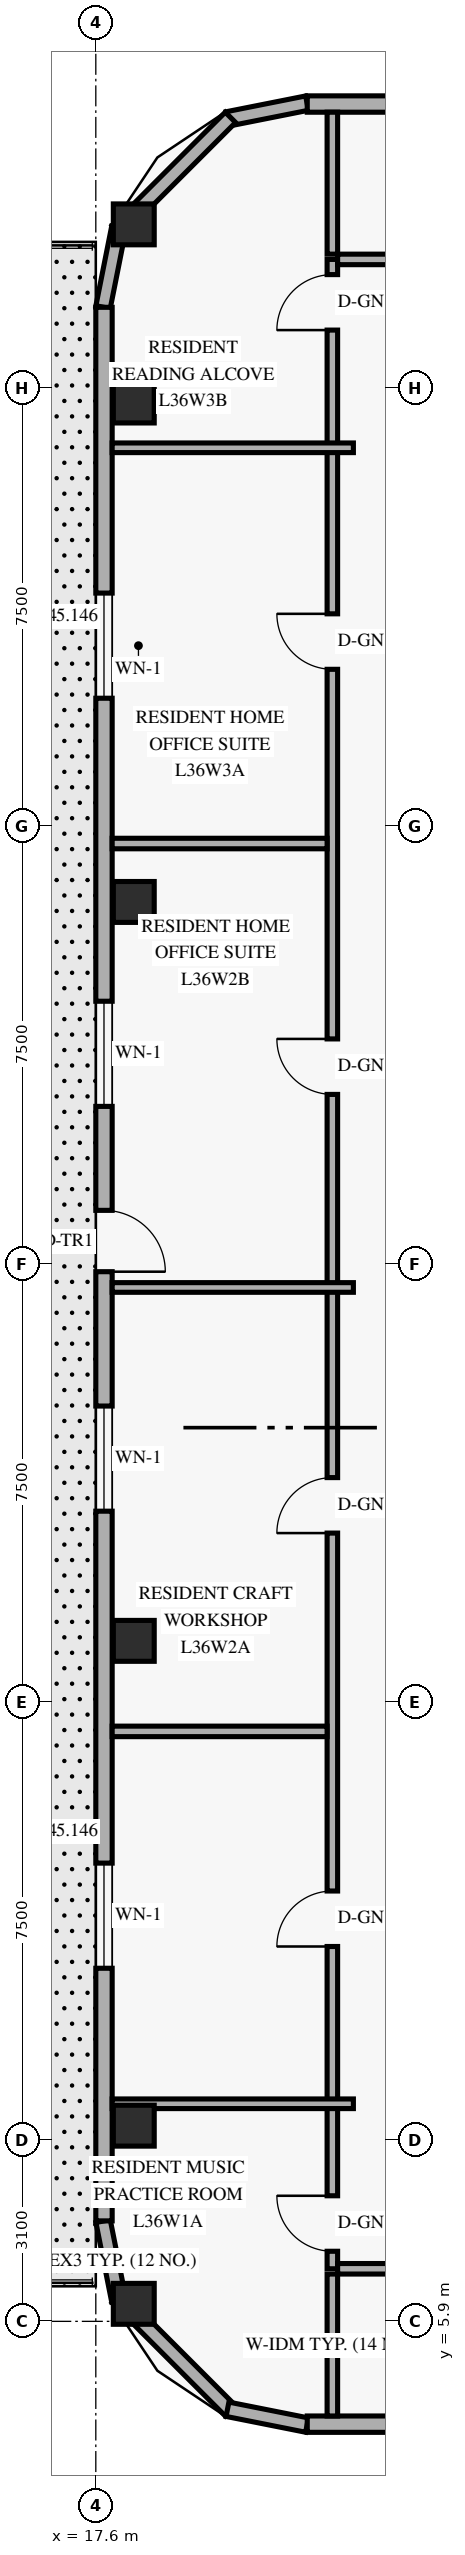
"""IFC4 building model, lengths in metres.
Left out: names, types, materials, properties, quantities, classifications, styles, units other than length and angle.
Written with IfcOpenShell. Run it as: python <this file> out.ifc"""

import sys

from ifc_helpers import new_model, si_unit, direction, frame, frame_2d, origin, origin_2d, place, context, subcontext, project, spatial, rectangle, extrude, element, fill, save


model = new_model("IFC4")
c1 = context("Model", 3, precision=1e-05, world=origin(), true_north=direction((0.0, 1.0)))
c2 = subcontext(c1, "Body", "Model", "MODEL_VIEW")
j1 = project(units=[si_unit("LENGTHUNIT", "METRE"), si_unit("PLANEANGLEUNIT", "RADIAN")], contexts=[c1])
p1 = place(None, origin())
s1 = spatial("IfcSite", under=j1, at=p1, CompositionType="ELEMENT")
p2 = place(p1, origin())
s2 = spatial("IfcBuilding", under=s1, at=p2, CompositionType="ELEMENT")
p3 = place(p2, frame((0.0, 0.0, 141.0)))
s3 = spatial("IfcBuildingStorey", under=s2, at=p3, CompositionType="ELEMENT", Elevation=141.0)
for number, where, z_axis, x_axis in (
    (1, (18.25, 6.2, 0.0), (0.0, 0.0, 1.0), (1.0, 0.0, 0.0)),
    (2, (18.25, 9.25, 0.0), (0.0, 0.0, 1.0), (1.0, 0.0, 0.0)),
    (3, (18.25, 17.55, 0.0), (0.0, 0.0, 1.0), (1.0, 0.0, 0.0)),
    (4, (18.25, 30.2, 0.0), (0.0, 0.0, 1.0), (1.0, 0.0, 0.0)),
    (5, (18.25, 38.75, 0.0), (0.0, 0.0, 1.0), (1.0, 0.0, 0.0)),
    (6, (18.25, 41.8, 0.0), (0.0, 0.0, 1.0), (1.0, 0.0, 0.0)),
):
    element("IfcColumn", number, at=place(p3, frame(where, z_axis=z_axis, x_axis=x_axis)), inside=s3, PredefinedType="COLUMN", context=c2, shape_type="SweptSolid", body=[
        extrude(rectangle(XDim=0.7, YDim=0.7, at=origin_2d()), origin(), (0.0, 0.0, 1.0), 3.6),
    ])
p4 = place(p3, frame((17.724, 7.616, 0.0), z_axis=(0.0, 0.0, 1.0), x_axis=(0.195135625965, -0.9807762678, 0.0)))
e7 = element("IfcWall", 7, at=p4, inside=s3, PredefinedType="SOLIDWALL", context=c2, shape_type="SweptSolid", body=[
    extrude(rectangle(XDim=1.389, YDim=0.25, at=frame_2d((0.694, 0.0))), origin(), (0.0, 0.0, 1.0), 3.36),
])
p5 = place(p3, frame((17.968, 6.305, 0.0), z_axis=(0.0, 0.0, 1.0), x_axis=(0.707106781187, -0.707106781187, 0.0)))
e8 = element("IfcWall", 8, at=p5, inside=s3, PredefinedType="SOLIDWALL", context=c2, shape_type="SweptSolid", body=[
    extrude(rectangle(XDim=2.739, YDim=0.25, at=frame_2d((1.37, 0.0))), origin(), (0.0, 0.0, 1.0), 3.36),
])
for number, where, z_axis, x_axis in (
    (9, (19.854, 4.395, 0.0), (0.0, 0.0, 1.0), (0.981, -0.195, 0.0)),
    (10, (21.217, 43.876, 0.0), (0.0, 0.0, 1.0), (-0.981, -0.195, 0.0)),
):
    element("IfcWall", number, at=place(p3, frame(where, z_axis=z_axis, x_axis=x_axis)), inside=s3, PredefinedType="SOLIDWALL", context=c2, shape_type="SweptSolid", body=[
        extrude(rectangle(XDim=1.389, YDim=0.25, at=frame_2d((0.694, 0.0))), origin(), (0.0, 0.0, 1.0), 3.36),
    ])
p6 = place(p3, frame((19.905, 43.632, 0.0), z_axis=(0.0, 0.0, 1.0), x_axis=(-0.707106781187, -0.707106781187, 0.0)))
e11 = element("IfcWall", 11, at=p6, inside=s3, PredefinedType="SOLIDWALL", context=c2, shape_type="SweptSolid", body=[
    extrude(rectangle(XDim=2.739, YDim=0.25, at=frame_2d((1.37, 0.0))), origin(), (0.0, 0.0, 1.0), 3.36),
])
p7 = place(p3, frame((17.995, 41.746, 0.0), z_axis=(0.0, 0.0, 1.0), x_axis=(-0.195135625965, -0.9807762678, 0.0)))
e12 = element("IfcWall", 12, at=p7, inside=s3, PredefinedType="SOLIDWALL", context=c2, shape_type="SweptSolid", body=[
    extrude(rectangle(XDim=1.389, YDim=0.25, at=frame_2d((0.694, 0.0))), origin(), (0.0, 0.0, 1.0), 3.36),
])
p8 = place(p3, frame((21.22, 4.14, 0.0), z_axis=(0.0, 0.0, 1.0), x_axis=(1.0, 0.0, 0.0)))
e13 = element("IfcWall", 13, at=p8, inside=s3, PredefinedType="SOLIDWALL", context=c2, shape_type="SweptSolid", body=[
    extrude(rectangle(XDim=33.76, YDim=0.28, at=frame_2d((16.88, 0.0))), origin(), (0.0, 0.0, 1.0), 3.36),
])
p9 = place(p8, frame((2.33, 0.0, 0.85)))
e14 = element("IfcOpeningElement", 14, at=p9, cuts=e13, PredefinedType="OPENING", context=c2, shape_type="SweptSolid", body=[
    extrude(rectangle(XDim=1.65, YDim=1.6, at=frame_2d((0.825, 0.8))), frame((0.0, 0.15, 0.0), z_axis=(0.0, -1.0, 0.0), x_axis=(1.0, 0.0, 0.0)), (0.0, 0.0, 1.0), 0.3),
])
p10 = place(p8, frame((9.215, 0.0, 0.85)))
e15 = element("IfcOpeningElement", 15, at=p10, cuts=e13, PredefinedType="OPENING", context=c2, shape_type="SweptSolid", body=[
    extrude(rectangle(XDim=1.65, YDim=1.6, at=frame_2d((0.825, 0.8))), frame((0.0, 0.15, 0.0), z_axis=(0.0, -1.0, 0.0), x_axis=(1.0, 0.0, 0.0)), (0.0, 0.0, 1.0), 0.3),
])
p11 = place(p8, frame((14.64, 0.0, 0.85)))
e16 = element("IfcOpeningElement", 16, at=p11, cuts=e13, PredefinedType="OPENING", context=c2, shape_type="SweptSolid", body=[
    extrude(rectangle(XDim=1.65, YDim=1.6, at=frame_2d((0.825, 0.8))), frame((0.0, 0.15, 0.0), z_axis=(0.0, -1.0, 0.0), x_axis=(1.0, 0.0, 0.0)), (0.0, 0.0, 1.0), 0.3),
])
p12 = place(p8, frame((19.367, 0.0, 0.85)))
e17 = element("IfcOpeningElement", 17, at=p12, cuts=e13, PredefinedType="OPENING", context=c2, shape_type="SweptSolid", body=[
    extrude(rectangle(XDim=1.65, YDim=1.6, at=frame_2d((0.825, 0.8))), frame((0.0, 0.15, 0.0), z_axis=(0.0, -1.0, 0.0), x_axis=(1.0, 0.0, 0.0)), (0.0, 0.0, 1.0), 0.3),
])
p13 = place(p8, frame((26.292, 0.0, 0.85)))
e18 = element("IfcOpeningElement", 18, at=p13, cuts=e13, PredefinedType="OPENING", context=c2, shape_type="SweptSolid", body=[
    extrude(rectangle(XDim=1.65, YDim=1.6, at=frame_2d((0.825, 0.8))), frame((0.0, 0.15, 0.0), z_axis=(0.0, -1.0, 0.0), x_axis=(1.0, 0.0, 0.0)), (0.0, 0.0, 1.0), 0.3),
])
p14 = place(p8, frame((31.345, 0.0, 0.85)))
e19 = element("IfcOpeningElement", 19, at=p14, cuts=e13, PredefinedType="OPENING", context=c2, shape_type="SweptSolid", body=[
    extrude(rectangle(XDim=1.65, YDim=1.6, at=frame_2d((0.825, 0.8))), frame((0.0, 0.15, 0.0), z_axis=(0.0, -1.0, 0.0), x_axis=(1.0, 0.0, 0.0)), (0.0, 0.0, 1.0), 0.3),
])
p15 = place(p3, frame((54.98, 43.86, 0.0), z_axis=(0.0, 0.0, 1.0), x_axis=(-1.0, 0.0, 0.0)))
e20 = element("IfcWall", 20, at=p15, inside=s3, PredefinedType="SOLIDWALL", context=c2, shape_type="SweptSolid", body=[
    extrude(rectangle(XDim=33.76, YDim=0.28, at=frame_2d((16.88, 0.0))), origin(), (0.0, 0.0, 1.0), 3.36),
])
p16 = place(p15, frame((28.555, 0.0, 0.85)))
e21 = element("IfcOpeningElement", 21, at=p16, cuts=e20, PredefinedType="OPENING", context=c2, shape_type="SweptSolid", body=[
    extrude(rectangle(XDim=1.65, YDim=1.6, at=frame_2d((0.825, 0.8))), frame((0.0, 0.15, 0.0), z_axis=(0.0, -1.0, 0.0), x_axis=(1.0, 0.0, 0.0)), (0.0, 0.0, 1.0), 0.3),
])
p17 = place(p15, frame((21.67, 0.0, 0.85)))
e22 = element("IfcOpeningElement", 22, at=p17, cuts=e20, PredefinedType="OPENING", context=c2, shape_type="SweptSolid", body=[
    extrude(rectangle(XDim=1.65, YDim=1.6, at=frame_2d((0.825, 0.8))), frame((0.0, 0.15, 0.0), z_axis=(0.0, -1.0, 0.0), x_axis=(1.0, 0.0, 0.0)), (0.0, 0.0, 1.0), 0.3),
])
p18 = place(p15, frame((14.476, 0.0, 0.85)))
e23 = element("IfcOpeningElement", 23, at=p18, cuts=e20, PredefinedType="OPENING", context=c2, shape_type="SweptSolid", body=[
    extrude(rectangle(XDim=1.65, YDim=1.6, at=frame_2d((0.825, 0.8))), frame((0.0, 0.15, 0.0), z_axis=(0.0, -1.0, 0.0), x_axis=(1.0, 0.0, 0.0)), (0.0, 0.0, 1.0), 0.3),
])
p19 = place(p15, frame((6.286, 0.0, 0.85)))
e24 = element("IfcOpeningElement", 24, at=p19, cuts=e20, PredefinedType="OPENING", context=c2, shape_type="SweptSolid", body=[
    extrude(rectangle(XDim=1.65, YDim=1.6, at=frame_2d((0.825, 0.8))), frame((0.0, 0.15, 0.0), z_axis=(0.0, -1.0, 0.0), x_axis=(1.0, 0.0, 0.0)), (0.0, 0.0, 1.0), 0.3),
])
p20 = place(p15, frame((0.971, 0.0, 0.85)))
e25 = element("IfcOpeningElement", 25, at=p20, cuts=e20, PredefinedType="OPENING", context=c2, shape_type="SweptSolid", body=[
    extrude(rectangle(XDim=1.65, YDim=1.6, at=frame_2d((0.825, 0.8))), frame((0.0, 0.15, 0.0), z_axis=(0.0, -1.0, 0.0), x_axis=(1.0, 0.0, 0.0)), (0.0, 0.0, 1.0), 0.3),
])
p21 = place(p3, frame((17.74, 40.38, 0.0), z_axis=(0.0, 0.0, 1.0), x_axis=(0.0, -1.0, 0.0)))
e26 = element("IfcWall", 26, at=p21, inside=s3, PredefinedType="SOLIDWALL", context=c2, shape_type="SweptSolid", body=[
    extrude(rectangle(XDim=32.76, YDim=0.28, at=frame_2d((16.38, 0.0))), origin(), (0.0, 0.0, 1.0), 3.36),
])
p22 = place(p21, frame((15.46, 0.0, 0.0)))
e27 = element("IfcOpeningElement", 27, at=p22, cuts=e26, PredefinedType="OPENING", context=c2, shape_type="SweptSolid", body=[
    extrude(rectangle(XDim=1.05, YDim=2.15, at=frame_2d((0.525, 1.075))), frame((0.0, 0.15, 0.0), z_axis=(0.0, -1.0, 0.0), x_axis=(1.0, 0.0, 0.0)), (0.0, 0.0, 1.0), 0.3),
])
p23 = place(p21, frame((26.635, 0.0, 0.85)))
e28 = element("IfcOpeningElement", 28, at=p23, cuts=e26, PredefinedType="OPENING", context=c2, shape_type="SweptSolid", body=[
    extrude(rectangle(XDim=1.8, YDim=1.6, at=frame_2d((0.9, 0.8))), frame((0.0, 0.15, 0.0), z_axis=(0.0, -1.0, 0.0), x_axis=(1.0, 0.0, 0.0)), (0.0, 0.0, 1.0), 0.3),
])
p24 = place(p21, frame((18.81, 0.0, 0.85)))
e29 = element("IfcOpeningElement", 29, at=p24, cuts=e26, PredefinedType="OPENING", context=c2, shape_type="SweptSolid", body=[
    extrude(rectangle(XDim=1.8, YDim=1.6, at=frame_2d((0.9, 0.8))), frame((0.0, 0.15, 0.0), z_axis=(0.0, -1.0, 0.0), x_axis=(1.0, 0.0, 0.0)), (0.0, 0.0, 1.0), 0.3),
])
p25 = place(p21, frame((11.88, 0.0, 0.85)))
e30 = element("IfcOpeningElement", 30, at=p25, cuts=e26, PredefinedType="OPENING", context=c2, shape_type="SweptSolid", body=[
    extrude(rectangle(XDim=1.8, YDim=1.6, at=frame_2d((0.9, 0.8))), frame((0.0, 0.15, 0.0), z_axis=(0.0, -1.0, 0.0), x_axis=(1.0, 0.0, 0.0)), (0.0, 0.0, 1.0), 0.3),
])
p26 = place(p21, frame((4.893, 0.0, 0.85)))
e31 = element("IfcOpeningElement", 31, at=p26, cuts=e26, PredefinedType="OPENING", context=c2, shape_type="SweptSolid", body=[
    extrude(rectangle(XDim=1.8, YDim=1.6, at=frame_2d((0.9, 0.8))), frame((0.0, 0.15, 0.0), z_axis=(0.0, -1.0, 0.0), x_axis=(1.0, 0.0, 0.0)), (0.0, 0.0, 1.0), 0.3),
])
p27 = place(p3, frame((21.65, 6.8, 0.0), z_axis=(0.0, 0.0, 1.0), x_axis=(0.0, 1.0, 0.0)))
e32 = element("IfcWall", 32, at=p27, inside=s3, PredefinedType="STANDARD", context=c2, shape_type="SweptSolid", body=[
    extrude(rectangle(XDim=34.4, YDim=0.18, at=frame_2d((17.2, 0.0))), origin(), (0.0, 0.0, 1.0), 2.73),
])
p28 = place(p27, frame((0.3, 0.0, 0.0)))
e33 = element("IfcOpeningElement", 33, at=p28, cuts=e32, PredefinedType="OPENING", context=c2, shape_type="SweptSolid", body=[
    extrude(rectangle(XDim=0.95, YDim=2.15, at=frame_2d((0.475, 1.075))), frame((0.0, 0.1, 0.0), z_axis=(0.0, -1.0, 0.0), x_axis=(1.0, 0.0, 0.0)), (0.0, 0.0, 1.0), 0.2),
])
p29 = place(p27, frame((5.518, 0.0, 0.0)))
e34 = element("IfcOpeningElement", 34, at=p29, cuts=e32, PredefinedType="OPENING", context=c2, shape_type="SweptSolid", body=[
    extrude(rectangle(XDim=0.95, YDim=2.15, at=frame_2d((0.475, 1.075))), frame((0.0, 0.1, 0.0), z_axis=(0.0, -1.0, 0.0), x_axis=(1.0, 0.0, 0.0)), (0.0, 0.0, 1.0), 0.2),
])
p30 = place(p27, frame((12.595, 0.0, 0.0)))
e35 = element("IfcOpeningElement", 35, at=p30, cuts=e32, PredefinedType="OPENING", context=c2, shape_type="SweptSolid", body=[
    extrude(rectangle(XDim=0.95, YDim=2.15, at=frame_2d((0.475, 1.075))), frame((0.0, 0.1, 0.0), z_axis=(0.0, -1.0, 0.0), x_axis=(1.0, 0.0, 0.0)), (0.0, 0.0, 1.0), 0.2),
])
p31 = place(p27, frame((20.105, 0.0, 0.0)))
e36 = element("IfcOpeningElement", 36, at=p31, cuts=e32, PredefinedType="OPENING", context=c2, shape_type="SweptSolid", body=[
    extrude(rectangle(XDim=0.95, YDim=2.15, at=frame_2d((0.475, 1.075))), frame((0.0, 0.1, 0.0), z_axis=(0.0, -1.0, 0.0), x_axis=(1.0, 0.0, 0.0)), (0.0, 0.0, 1.0), 0.2),
])
p32 = place(p27, frame((27.383, 0.0, 0.0)))
e37 = element("IfcOpeningElement", 37, at=p32, cuts=e32, PredefinedType="OPENING", context=c2, shape_type="SweptSolid", body=[
    extrude(rectangle(XDim=0.95, YDim=2.15, at=frame_2d((0.475, 1.075))), frame((0.0, 0.1, 0.0), z_axis=(0.0, -1.0, 0.0), x_axis=(1.0, 0.0, 0.0)), (0.0, 0.0, 1.0), 0.2),
])
p33 = place(p27, frame((33.19, 0.0, 0.0)))
e38 = element("IfcOpeningElement", 38, at=p33, cuts=e32, PredefinedType="OPENING", context=c2, shape_type="SweptSolid", body=[
    extrude(rectangle(XDim=0.95, YDim=2.15, at=frame_2d((0.475, 1.075))), frame((0.0, 0.1, 0.0), z_axis=(0.0, -1.0, 0.0), x_axis=(1.0, 0.0, 0.0)), (0.0, 0.0, 1.0), 0.2),
])
p34 = place(p3, frame((21.74, 6.8, 0.0), z_axis=(0.0, 0.0, 1.0), x_axis=(1.0, 0.0, 0.0)))
e39 = element("IfcWall", 39, at=p34, inside=s3, PredefinedType="STANDARD", context=c2, shape_type="SweptSolid", body=[
    extrude(rectangle(XDim=13.68, YDim=0.18, at=frame_2d((6.84, 0.0))), origin(), (0.0, 0.0, 1.0), 2.73),
])
p35 = place(p34, frame((0.97, 0.0, 0.0)))
e40 = element("IfcOpeningElement", 40, at=p35, cuts=e39, PredefinedType="OPENING", context=c2, shape_type="SweptSolid", body=[
    extrude(rectangle(XDim=0.95, YDim=2.15, at=frame_2d((0.475, 1.075))), frame((0.0, 0.1, 0.0), z_axis=(0.0, -1.0, 0.0), x_axis=(1.0, 0.0, 0.0)), (0.0, 0.0, 1.0), 0.2),
])
p36 = place(p34, frame((9.11, 0.0, 0.0)))
e41 = element("IfcOpeningElement", 41, at=p36, cuts=e39, PredefinedType="OPENING", context=c2, shape_type="SweptSolid", body=[
    extrude(rectangle(XDim=0.95, YDim=2.15, at=frame_2d((0.475, 1.075))), frame((0.0, 0.1, 0.0), z_axis=(0.0, -1.0, 0.0), x_axis=(1.0, 0.0, 0.0)), (0.0, 0.0, 1.0), 0.2),
])
p37 = place(p3, frame((21.74, 41.2, 0.0), z_axis=(0.0, 0.0, 1.0), x_axis=(1.0, 0.0, 0.0)))
e42 = element("IfcWall", 42, at=p37, inside=s3, PredefinedType="STANDARD", context=c2, shape_type="SweptSolid", body=[
    extrude(rectangle(XDim=13.68, YDim=0.18, at=frame_2d((6.84, 0.0))), origin(), (0.0, 0.0, 1.0), 2.73),
])
p38 = place(p37, frame((2.95, 0.0, 0.0)))
e43 = element("IfcOpeningElement", 43, at=p38, cuts=e42, PredefinedType="OPENING", context=c2, shape_type="SweptSolid", body=[
    extrude(rectangle(XDim=0.95, YDim=2.15, at=frame_2d((0.475, 1.075))), frame((0.0, 0.1, 0.0), z_axis=(0.0, -1.0, 0.0), x_axis=(1.0, 0.0, 0.0)), (0.0, 0.0, 1.0), 0.2),
])
p39 = place(p37, frame((10.11, 0.0, 0.0)))
e44 = element("IfcOpeningElement", 44, at=p39, cuts=e42, PredefinedType="OPENING", context=c2, shape_type="SweptSolid", body=[
    extrude(rectangle(XDim=0.95, YDim=2.15, at=frame_2d((0.475, 1.075))), frame((0.0, 0.1, 0.0), z_axis=(0.0, -1.0, 0.0), x_axis=(1.0, 0.0, 0.0)), (0.0, 0.0, 1.0), 0.2),
])
for number, where, z_axis, x_axis in (
    (45, (21.65, 4.28, 0.0), (0.0, 0.0, 1.0), (0.0, 1.0, 0.0)),
    (46, (21.65, 41.29, 0.0), (0.0, 0.0, 1.0), (0.0, 1.0, 0.0)),
):
    element("IfcWall", number, at=place(p3, frame(where, z_axis=z_axis, x_axis=x_axis)), inside=s3, PredefinedType="PARTITIONING", context=c2, shape_type="SweptSolid", body=[
        extrude(rectangle(XDim=2.43, YDim=0.18, at=frame_2d((1.215, 0.0))), origin(), (0.0, 0.0, 1.0), 2.879),
    ])
p40 = place(p3, frame((17.88, 9.625, 0.0), z_axis=(0.0, 0.0, 1.0), x_axis=(1.0, 0.0, 0.0)))
e47 = element("IfcWall", 47, at=p40, inside=s3, PredefinedType="PARTITIONING", context=c2, shape_type="SweptSolid", body=[
    extrude(rectangle(XDim=4.13, YDim=0.165, at=frame_2d((2.065, 0.0))), origin(), (0.0, 0.0, 1.0), 2.879),
])
p41 = place(p3, frame((17.88, 16.0, 0.0), z_axis=(0.0, 0.0, 1.0), x_axis=(1.0, 0.0, 0.0)))
e48 = element("IfcWall", 48, at=p41, inside=s3, PredefinedType="PARTITIONING", context=c2, shape_type="SweptSolid", body=[
    extrude(rectangle(XDim=3.68, YDim=0.18, at=frame_2d((1.84, 0.0))), origin(), (0.0, 0.0, 1.0), 2.879),
])
p42 = place(p3, frame((17.88, 23.6, 0.0), z_axis=(0.0, 0.0, 1.0), x_axis=(1.0, 0.0, 0.0)))
e49 = element("IfcWall", 49, at=p42, inside=s3, PredefinedType="PARTITIONING", context=c2, shape_type="SweptSolid", body=[
    extrude(rectangle(XDim=4.13, YDim=0.165, at=frame_2d((2.065, 0.0))), origin(), (0.0, 0.0, 1.0), 2.879),
])
p43 = place(p3, frame((17.88, 31.2, 0.0), z_axis=(0.0, 0.0, 1.0), x_axis=(1.0, 0.0, 0.0)))
e50 = element("IfcWall", 50, at=p43, inside=s3, PredefinedType="PARTITIONING", context=c2, shape_type="SweptSolid", body=[
    extrude(rectangle(XDim=3.68, YDim=0.18, at=frame_2d((1.84, 0.0))), origin(), (0.0, 0.0, 1.0), 2.879),
])
p44 = place(p3, frame((17.88, 37.975, 0.0), z_axis=(0.0, 0.0, 1.0), x_axis=(1.0, 0.0, 0.0)))
e51 = element("IfcWall", 51, at=p44, inside=s3, PredefinedType="PARTITIONING", context=c2, shape_type="SweptSolid", body=[
    extrude(rectangle(XDim=4.13, YDim=0.165, at=frame_2d((2.065, 0.0))), origin(), (0.0, 0.0, 1.0), 2.879),
])
p45 = place(p22, origin())
e52 = element("IfcDoor", 52, at=p45, inside=s3, OperationType="SINGLE_SWING_RIGHT", PredefinedType="DOOR", context=c2, shape_type="SweptSolid", body=[
    extrude(rectangle(XDim=1.05, YDim=2.15, at=frame_2d((0.525, 1.075))), frame((0.0, 0.025, 0.0), z_axis=(0.0, -1.0, 0.0), x_axis=(1.0, 0.0, 0.0)), (0.0, 0.0, 1.0), 0.05),
])
fill(e27, e52)
p46 = place(p23, origin())
e53 = element("IfcWindow", 53, at=p46, inside=s3, PartitioningType="SINGLE_PANEL", PredefinedType="WINDOW", context=c2, shape_type="SweptSolid", body=[
    extrude(rectangle(XDim=1.8, YDim=1.6, at=frame_2d((0.9, 0.8))), frame((0.0, 0.03, 0.0), z_axis=(0.0, -1.0, 0.0), x_axis=(1.0, 0.0, 0.0)), (0.0, 0.0, 1.0), 0.06),
])
fill(e28, e53)
p47 = place(p24, origin())
e54 = element("IfcWindow", 54, at=p47, inside=s3, PartitioningType="SINGLE_PANEL", PredefinedType="WINDOW", context=c2, shape_type="SweptSolid", body=[
    extrude(rectangle(XDim=1.8, YDim=1.6, at=frame_2d((0.9, 0.8))), frame((0.0, 0.03, 0.0), z_axis=(0.0, -1.0, 0.0), x_axis=(1.0, 0.0, 0.0)), (0.0, 0.0, 1.0), 0.06),
])
fill(e29, e54)
p48 = place(p25, origin())
e55 = element("IfcWindow", 55, at=p48, inside=s3, PartitioningType="SINGLE_PANEL", PredefinedType="WINDOW", context=c2, shape_type="SweptSolid", body=[
    extrude(rectangle(XDim=1.8, YDim=1.6, at=frame_2d((0.9, 0.8))), frame((0.0, 0.03, 0.0), z_axis=(0.0, -1.0, 0.0), x_axis=(1.0, 0.0, 0.0)), (0.0, 0.0, 1.0), 0.06),
])
fill(e30, e55)
p49 = place(p26, origin())
e56 = element("IfcWindow", 56, at=p49, inside=s3, PartitioningType="SINGLE_PANEL", PredefinedType="WINDOW", context=c2, shape_type="SweptSolid", body=[
    extrude(rectangle(XDim=1.8, YDim=1.6, at=frame_2d((0.9, 0.8))), frame((0.0, 0.03, 0.0), z_axis=(0.0, -1.0, 0.0), x_axis=(1.0, 0.0, 0.0)), (0.0, 0.0, 1.0), 0.06),
])
fill(e31, e56)
p50 = place(p28, origin())
e57 = element("IfcDoor", 57, at=p50, inside=s3, OperationType="SINGLE_SWING_RIGHT", PredefinedType="DOOR", context=c2, shape_type="SweptSolid", body=[
    extrude(rectangle(XDim=0.95, YDim=2.15, at=frame_2d((0.475, 1.075))), frame((0.0, 0.025, 0.0), z_axis=(0.0, -1.0, 0.0), x_axis=(1.0, 0.0, 0.0)), (0.0, 0.0, 1.0), 0.05),
])
fill(e33, e57)
p51 = place(p29, origin())
e58 = element("IfcDoor", 58, at=p51, inside=s3, OperationType="SINGLE_SWING_LEFT", PredefinedType="DOOR", context=c2, shape_type="SweptSolid", body=[
    extrude(rectangle(XDim=0.95, YDim=2.15, at=frame_2d((0.475, 1.075))), frame((0.0, 0.025, 0.0), z_axis=(0.0, -1.0, 0.0), x_axis=(1.0, 0.0, 0.0)), (0.0, 0.0, 1.0), 0.05),
])
fill(e34, e58)
p52 = place(p30, origin())
e59 = element("IfcDoor", 59, at=p52, inside=s3, OperationType="SINGLE_SWING_LEFT", PredefinedType="DOOR", context=c2, shape_type="SweptSolid", body=[
    extrude(rectangle(XDim=0.95, YDim=2.15, at=frame_2d((0.475, 1.075))), frame((0.0, 0.025, 0.0), z_axis=(0.0, -1.0, 0.0), x_axis=(1.0, 0.0, 0.0)), (0.0, 0.0, 1.0), 0.05),
])
fill(e35, e59)
p53 = place(p31, origin())
e60 = element("IfcDoor", 60, at=p53, inside=s3, OperationType="SINGLE_SWING_RIGHT", PredefinedType="DOOR", context=c2, shape_type="SweptSolid", body=[
    extrude(rectangle(XDim=0.95, YDim=2.15, at=frame_2d((0.475, 1.075))), frame((0.0, 0.025, 0.0), z_axis=(0.0, -1.0, 0.0), x_axis=(1.0, 0.0, 0.0)), (0.0, 0.0, 1.0), 0.05),
])
fill(e36, e60)
p54 = place(p32, origin())
e61 = element("IfcDoor", 61, at=p54, inside=s3, OperationType="SINGLE_SWING_RIGHT", PredefinedType="DOOR", context=c2, shape_type="SweptSolid", body=[
    extrude(rectangle(XDim=0.95, YDim=2.15, at=frame_2d((0.475, 1.075))), frame((0.0, 0.025, 0.0), z_axis=(0.0, -1.0, 0.0), x_axis=(1.0, 0.0, 0.0)), (0.0, 0.0, 1.0), 0.05),
])
fill(e37, e61)
p55 = place(p33, origin())
e62 = element("IfcDoor", 62, at=p55, inside=s3, OperationType="SINGLE_SWING_LEFT", PredefinedType="DOOR", context=c2, shape_type="SweptSolid", body=[
    extrude(rectangle(XDim=0.95, YDim=2.15, at=frame_2d((0.475, 1.075))), frame((0.0, 0.025, 0.0), z_axis=(0.0, -1.0, 0.0), x_axis=(1.0, 0.0, 0.0)), (0.0, 0.0, 1.0), 0.05),
])
fill(e38, e62)
save(model, sys.argv[1])
